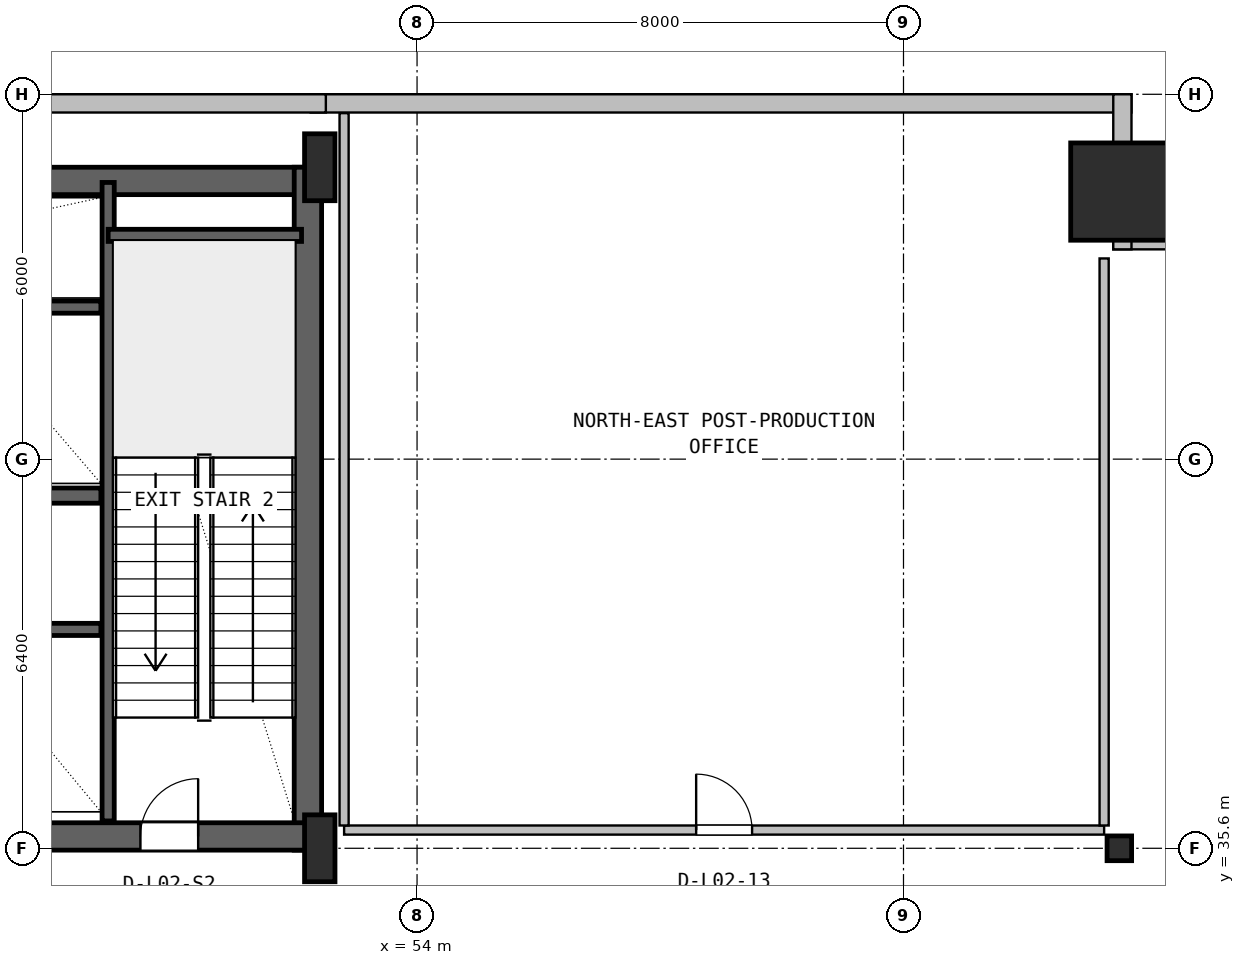
"""IFC4 building model, lengths in metres.
Left out: names, types, materials, properties, quantities, classifications, styles, units other than length and angle.
Written with IfcOpenShell. Run it as: python <this file> out.ifc"""

import sys

from ifc_helpers import new_model, si_unit, direction, frame, frame_2d, origin, origin_2d, place, context, subcontext, project, spatial, rectangle, hollow_rectangle, i_section, extrude, source, transform, mapped, element, fill, save


model = new_model("IFC4")
c1 = context("Model", 3, precision=1e-05, world=origin(), true_north=direction((0.0, 1.0)))
c2 = subcontext(c1, "Body", "Model", "MODEL_VIEW")
j1 = project(units=[si_unit("LENGTHUNIT", "METRE"), si_unit("PLANEANGLEUNIT", "RADIAN")], contexts=[c1])
p1 = place(None, origin())
s1 = spatial("IfcSite", under=j1, at=p1, CompositionType="ELEMENT")
p2 = place(p1, origin())
s2 = spatial("IfcBuilding", under=s1, at=p2, CompositionType="ELEMENT")
p3 = place(p2, frame((0.0, 0.0, 11.4)))
s3 = spatial("IfcBuildingStorey", under=s2, at=p3, CompositionType="ELEMENT", Elevation=11.4)
p4 = place(p3, frame((15.6, 46.575, 0.0), z_axis=(0.0, 0.0, 1.0), x_axis=(1.0, 0.0, 0.0)))
e1 = element("IfcWall", 1, at=p4, inside=s3, PredefinedType="SHEAR", context=c2, shape_type="SweptSolid", body=[
    extrude(rectangle(XDim=36.8, YDim=0.45, at=frame_2d((18.4, 0.0))), origin(), (0.0, 0.0, 1.0), 5.12),
])
p5 = place(p3, frame((52.205, 35.57, 0.0), z_axis=(0.0, 0.0, 1.0), x_axis=(0.0, 1.0, 0.0)))
e2 = element("IfcWall", 2, at=p5, inside=s3, PredefinedType="SHEAR", context=c2, shape_type="SweptSolid", body=[
    extrude(rectangle(XDim=11.23, YDim=0.45, at=frame_2d((5.615, 0.0))), origin(), (0.0, 0.0, 1.0), 5.12),
])
p6 = place(p3, frame((43.2, 35.795, 0.0), z_axis=(0.0, 0.0, 1.0), x_axis=(1.0, 0.0, 0.0)))
e3 = element("IfcWall", 3, at=p6, inside=s3, PredefinedType="SHEAR", context=c2, shape_type="SweptSolid", body=[
    extrude(rectangle(XDim=9.23, YDim=0.45, at=frame_2d((4.615, 0.0))), origin(), (0.0, 0.0, 1.0), 5.12),
])
p7 = place(p6, frame((6.25, 0.0, 0.0)))
e4 = element("IfcOpeningElement", 4, at=p7, cuts=e3, PredefinedType="OPENING", context=c2, shape_type="SweptSolid", body=[
    extrude(rectangle(XDim=0.95, YDim=2.1, at=frame_2d((0.475, 1.05))), frame((0.0, 0.235, 0.0), z_axis=(0.0, -1.0, 0.0), x_axis=(1.0, 0.0, 0.0)), (0.0, 0.0, 1.0), 0.47),
])
m1 = source(origin(), c2, "Body", "SweptSolid", [
    extrude(i_section(OverallWidth=0.5, OverallDepth=1.1, WebThickness=0.018, FlangeThickness=0.032, FilletRadius=0.018, at=origin_2d()), origin(), (0.0, 0.0, 1.0), 5.4),
])
for number, where, z_axis, x_axis in (
    (5, (52.4, 35.6, 0.0), (0.0, 0.0, 1.0), (1.0, 0.0, 0.0)),
    (6, (52.4, 46.8, 0.0), (0.0, 0.0, 1.0), (1.0, 0.0, 0.0)),
):
    element("IfcColumn", number, at=place(p3, frame(where, z_axis=z_axis, x_axis=x_axis)), inside=s3, PredefinedType="COLUMN", context=c2, shape_type="MappedRepresentation", body=[
        mapped(m1, transform((0.0, 0.0, 0.0), x_axis=(1.0, 0.0, 0.0), y_axis=(0.0, 1.0, 0.0), z_axis=(0.0, 0.0, 1.0), scale=1.0)),
    ])
m2 = source(origin(), c2, "Body", "SweptSolid", [
    extrude(hollow_rectangle(XDim=1.6, YDim=1.6, WallThickness=0.06, at=origin_2d()), origin(), (0.0, 0.0, 1.0), 5.4),
])
p8 = place(p3, frame((65.55, 46.4, 0.0), z_axis=(0.0, 0.0, 1.0), x_axis=(1.0, 0.0, 0.0)))
e7 = element("IfcColumn", 7, at=p8, inside=s3, PredefinedType="COLUMN", context=c2, shape_type="MappedRepresentation", body=[
    mapped(m2, transform((0.0, 0.0, 0.0), x_axis=(1.0, 0.0, 0.0), y_axis=(0.0, 1.0, 0.0), z_axis=(0.0, 0.0, 1.0), scale=1.0)),
])
m3 = source(origin(), c2, "Body", "SweptSolid", [
    extrude(i_section(OverallWidth=0.404, OverallDepth=0.407, WebThickness=0.027, FlangeThickness=0.044, FilletRadius=0.018, at=origin_2d()), origin(), (0.0, 0.0, 1.0), 5.4),
])
p9 = place(p3, frame((65.55, 35.6, 0.0), z_axis=(0.0, 0.0, 1.0), x_axis=(1.0, 0.0, 0.0)))
e8 = element("IfcColumn", 8, at=p9, inside=s3, PredefinedType="COLUMN", context=c2, shape_type="MappedRepresentation", body=[
    mapped(m3, transform((0.0, 0.0, 0.0), x_axis=(1.0, 0.0, 0.0), y_axis=(0.0, 1.0, 0.0), z_axis=(0.0, 0.0, 1.0), scale=1.0)),
])
p10 = place(p3, frame((52.25, 47.85, 0.0), z_axis=(0.0, 0.0, 1.0), x_axis=(1.0, 0.0, 0.0)))
e9 = element("IfcWall", 9, at=p10, inside=s3, PredefinedType="SOLIDWALL", context=c2, shape_type="SweptSolid", body=[
    extrude(rectangle(XDim=13.5, YDim=0.3, at=frame_2d((6.75, 0.0))), origin(), (0.0, 0.0, 1.0), 5.1),
])
p11 = place(p3, frame((15.5, 47.85, 0.0), z_axis=(0.0, 0.0, 1.0), x_axis=(1.0, 0.0, 0.0)))
e10 = element("IfcWall", 10, at=p11, inside=s3, PredefinedType="SOLIDWALL", context=c2, shape_type="SweptSolid", body=[
    extrude(rectangle(XDim=37.0, YDim=0.3, at=frame_2d((18.5, 0.0))), origin(), (0.0, 0.0, 1.0), 5.1),
])
for number, where, z_axis, x_axis in (
    (11, (65.45, 45.6, 0.0), (0.0, 0.0, 1.0), (1.0, 0.0, 0.0)),
    (12, (65.6, 45.45, 0.0), (0.0, 0.0, 1.0), (0.0, 1.0, 0.0)),
):
    element("IfcWall", number, at=place(p3, frame(where, z_axis=z_axis, x_axis=x_axis)), inside=s3, PredefinedType="SOLIDWALL", context=c2, shape_type="SweptSolid", body=[
        extrude(rectangle(XDim=2.55, YDim=0.3, at=frame_2d((1.275, 0.0))), origin(), (0.0, 0.0, 1.0), 4.183),
    ])
p12 = place(p3, frame((48.92, 36.05, 0.0), z_axis=(0.0, 0.0, 1.0), x_axis=(0.0, 1.0, 0.0)))
e13 = element("IfcWall", 13, at=p12, inside=s3, PredefinedType="SHEAR", context=c2, shape_type="SweptSolid", body=[
    extrude(rectangle(XDim=10.5, YDim=0.2, at=frame_2d((5.25, 0.0))), origin(), (0.0, 0.0, 1.0), 5.12),
])
p13 = place(p3, frame((48.92, 45.68, 0.0), z_axis=(0.0, 0.0, 1.0), x_axis=(1.0, 0.0, 0.0)))
e14 = element("IfcWall", 14, at=p13, inside=s3, PredefinedType="SHEAR", context=c2, shape_type="SweptSolid", body=[
    extrude(rectangle(XDim=3.18, YDim=0.2, at=frame_2d((1.59, 0.0))), origin(), (0.0, 0.0, 1.0), 5.12),
])
p14 = place(p3, frame((24.98, 41.4, 0.0), z_axis=(0.0, 0.0, 1.0), x_axis=(1.0, 0.0, 0.0)))
e15 = element("IfcWall", 15, at=p14, inside=s3, PredefinedType="SHEAR", context=c2, shape_type="SweptSolid", body=[
    extrude(rectangle(XDim=23.82, YDim=0.25, at=frame_2d((11.91, 0.0))), origin(), (0.0, 0.0, 1.0), 5.12),
])
p15 = place(p14, frame((0.87, 0.0, 0.0)))
e16 = element("IfcOpeningElement", 16, at=p15, cuts=e15, PredefinedType="OPENING", context=c2, shape_type="SweptSolid", body=[
    extrude(rectangle(XDim=1.1, YDim=2.18, at=frame_2d((0.55, 1.09))), frame((0.0, 0.135, 0.0), z_axis=(0.0, -1.0, 0.0), x_axis=(1.0, 0.0, 0.0)), (0.0, 0.0, 1.0), 0.27),
])
p16 = place(p14, frame((3.47, 0.0, 0.0)))
e17 = element("IfcOpeningElement", 17, at=p16, cuts=e15, PredefinedType="OPENING", context=c2, shape_type="SweptSolid", body=[
    extrude(rectangle(XDim=1.1, YDim=2.18, at=frame_2d((0.55, 1.09))), frame((0.0, 0.135, 0.0), z_axis=(0.0, -1.0, 0.0), x_axis=(1.0, 0.0, 0.0)), (0.0, 0.0, 1.0), 0.27),
])
p17 = place(p14, frame((6.07, 0.0, 0.0)))
e18 = element("IfcOpeningElement", 18, at=p17, cuts=e15, PredefinedType="OPENING", context=c2, shape_type="SweptSolid", body=[
    extrude(rectangle(XDim=1.1, YDim=2.18, at=frame_2d((0.55, 1.09))), frame((0.0, 0.135, 0.0), z_axis=(0.0, -1.0, 0.0), x_axis=(1.0, 0.0, 0.0)), (0.0, 0.0, 1.0), 0.27),
])
p18 = place(p3, frame((41.22, 44.5, 0.0), z_axis=(0.0, 0.0, 1.0), x_axis=(1.0, 0.0, 0.0)))
e19 = element("IfcWall", 19, at=p18, inside=s3, PredefinedType="SHEAR", context=c2, shape_type="SweptSolid", body=[
    extrude(rectangle(XDim=7.58, YDim=0.2, at=frame_2d((3.79, 0.0))), origin(), (0.0, 0.0, 1.0), 5.12),
])
p19 = place(p3, frame((43.65, 39.2, 0.0), z_axis=(0.0, 0.0, 1.0), x_axis=(1.0, 0.0, 0.0)))
e20 = element("IfcWall", 20, at=p19, inside=s3, PredefinedType="SHEAR", context=c2, shape_type="SweptSolid", body=[
    extrude(rectangle(XDim=5.15, YDim=0.2, at=frame_2d((2.575, 0.0))), origin(), (0.0, 0.0, 1.0), 5.12),
])
p20 = place(p3, frame((52.8, 35.9, 0.0), z_axis=(0.0, 0.0, 1.0), x_axis=(1.0, 0.0, 0.0)))
e21 = element("IfcWall", 21, at=p20, inside=s3, PredefinedType="PARTITIONING", context=c2, shape_type="SweptSolid", body=[
    extrude(rectangle(XDim=12.5, YDim=0.15, at=frame_2d((6.25, 0.0))), origin(), (0.0, 0.0, 1.0), 4.183),
])
p21 = place(p20, frame((5.79, 0.0, 0.0)))
e22 = element("IfcOpeningElement", 22, at=p21, cuts=e21, PredefinedType="OPENING", context=c2, shape_type="SweptSolid", body=[
    extrude(rectangle(XDim=0.92, YDim=2.08, at=frame_2d((0.46, 1.04))), frame((0.0, 0.085, 0.0), z_axis=(0.0, -1.0, 0.0), x_axis=(1.0, 0.0, 0.0)), (0.0, 0.0, 1.0), 0.17),
])
p22 = place(p3, frame((65.3, 35.975, 0.0), z_axis=(0.0, 0.0, 1.0), x_axis=(0.0, 1.0, 0.0)))
e23 = element("IfcWall", 23, at=p22, inside=s3, PredefinedType="PARTITIONING", context=c2, shape_type="SweptSolid", body=[
    extrude(rectangle(XDim=9.325, YDim=0.15, at=frame_2d((4.663, 0.0))), origin(), (0.0, 0.0, 1.0), 4.183),
])
p23 = place(p3, frame((52.8, 35.975, 0.0), z_axis=(0.0, 0.0, 1.0), x_axis=(0.0, 1.0, 0.0)))
e24 = element("IfcWall", 24, at=p23, inside=s3, PredefinedType="PARTITIONING", context=c2, shape_type="SweptSolid", body=[
    extrude(rectangle(XDim=11.715, YDim=0.15, at=frame_2d((5.857, 0.0))), origin(), (0.0, 0.0, 1.0), 4.183),
])
m4 = source(origin(), c2, "Body", "SweptSolid", [
    extrude(rectangle(XDim=0.95, YDim=2.1, at=frame_2d((0.475, 1.05))), frame((0.0, 0.025, 0.0), z_axis=(0.0, -1.0, 0.0), x_axis=(1.0, 0.0, 0.0)), (0.0, 0.0, 1.0), 0.05),
])
p24 = place(p7, origin())
e25 = element("IfcDoor", 25, at=p24, inside=s3, OperationType="SINGLE_SWING_RIGHT", PredefinedType="DOOR", context=c2, shape_type="MappedRepresentation", body=[
    mapped(m4, transform((0.0, 0.0, 0.0), x_axis=(1.0, 0.0, 0.0), y_axis=(0.0, 1.0, 0.0), z_axis=(0.0, 0.0, 1.0), scale=1.0)),
])
fill(e4, e25)
m5 = source(origin(), c2, "Body", "SweptSolid", [
    extrude(rectangle(XDim=0.92, YDim=2.08, at=frame_2d((0.46, 1.04))), frame((0.0, 0.025, 0.0), z_axis=(0.0, -1.0, 0.0), x_axis=(1.0, 0.0, 0.0)), (0.0, 0.0, 1.0), 0.05),
])
p25 = place(p21, origin())
e26 = element("IfcDoor", 26, at=p25, inside=s3, OperationType="SINGLE_SWING_LEFT", PredefinedType="DOOR", context=c2, shape_type="MappedRepresentation", body=[
    mapped(m5, transform((0.0, 0.0, 0.0), x_axis=(1.0, 0.0, 0.0), y_axis=(0.0, 1.0, 0.0), z_axis=(0.0, 0.0, 1.0), scale=1.0)),
])
fill(e22, e26)
save(model, sys.argv[1])
